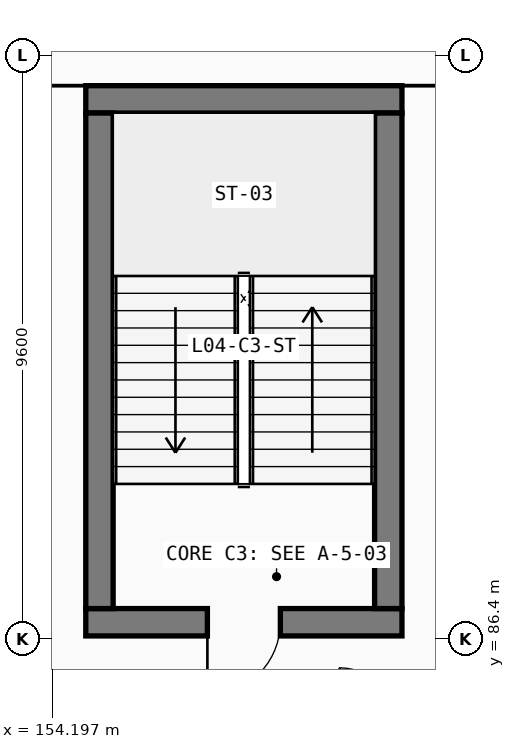
"""IFC4 building model, lengths in metres.
Left out: names, types, materials, properties, quantities, classifications, styles, units other than length and angle.
Written with IfcOpenShell. Run it as: python <this file> out.ifc"""

import sys

from ifc_helpers import new_model, si_unit, direction, frame, frame_2d, origin, place, context, subcontext, project, spatial, rectangle, extrude, element, fill, save


model = new_model("IFC4")
c1 = context("Model", 3, precision=1e-05, world=origin(), true_north=direction((0.0, 1.0)))
c2 = subcontext(c1, "Body", "Model", "MODEL_VIEW")
j1 = project(units=[si_unit("LENGTHUNIT", "METRE"), si_unit("PLANEANGLEUNIT", "RADIAN")], contexts=[c1])
p1 = place(None, origin())
s1 = spatial("IfcSite", under=j1, at=p1, CompositionType="ELEMENT")
p2 = place(p1, origin())
s2 = spatial("IfcBuilding", under=s1, at=p2, CompositionType="ELEMENT")
p3 = place(p2, frame((0.0, 0.0, 18.6)))
s3 = spatial("IfcBuildingStorey", under=s2, at=p3, CompositionType="ELEMENT", Elevation=18.6)
p4 = place(p3, frame((154.75, 86.675, 0.0), z_axis=(0.0, 0.0, 1.0), x_axis=(1.0, 0.0, 0.0)))
e1 = element("IfcWall", 1, at=p4, inside=s3, PredefinedType="SHEAR", context=c2, shape_type="SweptSolid", body=[
    extrude(rectangle(XDim=5.2, YDim=0.45, at=frame_2d((2.6, 0.0))), origin(), (0.0, 0.0, 1.0), 4.24),
])
p5 = place(p4, frame((3.2, 0.0, 0.0), z_axis=(0.0, 0.0, 1.0), x_axis=(-1.0, 0.0, 0.0)))
e2 = element("IfcOpeningElement", 2, at=p5, cuts=e1, PredefinedType="OPENING", context=c2, shape_type="SweptSolid", body=[
    extrude(rectangle(XDim=1.2, YDim=2.2, at=frame_2d((0.6, 1.1))), frame((0.0, 0.235, 0.0), z_axis=(0.0, -1.0, 0.0), x_axis=(1.0, 0.0, 0.0)), (0.0, 0.0, 1.0), 0.47),
])
p6 = place(p3, frame((159.95, 95.275, 0.0), z_axis=(0.0, 0.0, 1.0), x_axis=(-1.0, 0.0, 0.0)))
e3 = element("IfcWall", 3, at=p6, inside=s3, PredefinedType="SHEAR", context=c2, shape_type="SweptSolid", body=[
    extrude(rectangle(XDim=5.2, YDim=0.45, at=frame_2d((2.6, 0.0))), origin(), (0.0, 0.0, 1.0), 4.24),
])
for number, where, z_axis, x_axis in (
    (4, (154.975, 95.05, 0.0), (0.0, 0.0, 1.0), (0.0, -1.0, 0.0)),
    (5, (159.725, 86.9, 0.0), (0.0, 0.0, 1.0), (0.0, 1.0, 0.0)),
):
    element("IfcWall", number, at=place(p3, frame(where, z_axis=z_axis, x_axis=x_axis)), inside=s3, PredefinedType="SHEAR", context=c2, shape_type="SweptSolid", body=[
        extrude(rectangle(XDim=8.15, YDim=0.45, at=frame_2d((4.075, 0.0))), origin(), (0.0, 0.0, 1.0), 4.24),
    ])
p7 = place(p5, origin())
e6 = element("IfcDoor", 6, at=p7, inside=s3, OperationType="SINGLE_SWING_RIGHT", PredefinedType="DOOR", context=c2, shape_type="SweptSolid", body=[
    extrude(rectangle(XDim=1.2, YDim=2.2, at=frame_2d((0.6, 1.1))), frame((0.0, 0.025, 0.0), z_axis=(0.0, -1.0, 0.0), x_axis=(1.0, 0.0, 0.0)), (0.0, 0.0, 1.0), 0.05),
])
fill(e2, e6)
save(model, sys.argv[1])
